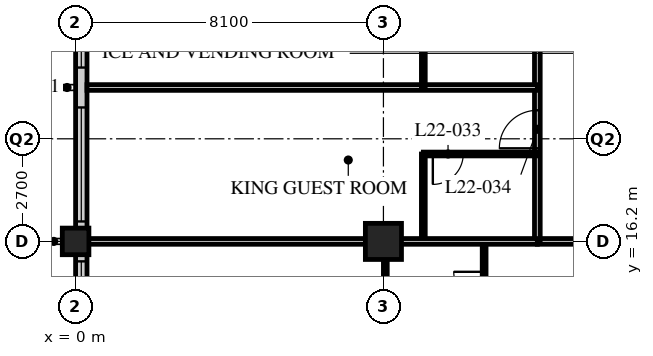
"""IFC4 building model, lengths in metres.
Left out: names, types, materials, properties, quantities, classifications, styles, units other than length and angle.
Written with IfcOpenShell. Run it as: python <this file> out.ifc"""

import sys

from ifc_helpers import new_model, si_unit, direction, frame, frame_2d, origin, origin_2d, place, context, subcontext, project, spatial, rectangle, hollow_rectangle, extrude, element, fill, save


model = new_model("IFC4")
c1 = context("Model", 3, precision=1e-05, world=origin(), true_north=direction((0.0, 1.0)))
c2 = subcontext(c1, "Body", "Model", "MODEL_VIEW")
j1 = project(units=[si_unit("LENGTHUNIT", "METRE"), si_unit("PLANEANGLEUNIT", "RADIAN")], contexts=[c1])
p1 = place(None, origin())
s1 = spatial("IfcSite", under=j1, at=p1, CompositionType="ELEMENT")
p2 = place(p1, origin())
s2 = spatial("IfcBuilding", under=s1, at=p2, CompositionType="ELEMENT")
p3 = place(p2, frame((0.0, 0.0, 87.4)))
s3 = spatial("IfcBuildingStorey", under=s2, at=p3, CompositionType="ELEMENT", Elevation=87.4)
p4 = place(p3, frame((0.0, 16.2, 0.0), z_axis=(0.0, 0.0, 1.0), x_axis=(1.0, 0.0, 0.0)))
e1 = element("IfcColumn", 1, at=p4, inside=s3, PredefinedType="COLUMN", context=c2, shape_type="SweptSolid", body=[
    extrude(hollow_rectangle(XDim=0.7, YDim=0.7, WallThickness=0.06, at=origin_2d()), origin(), (0.0, 0.0, 1.0), 3.4),
])
p5 = place(p3, frame((8.1, 16.2, 0.0), z_axis=(0.0, 0.0, 1.0), x_axis=(1.0, 0.0, 0.0)))
e2 = element("IfcColumn", 2, at=p5, inside=s3, PredefinedType="COLUMN", context=c2, shape_type="SweptSolid", body=[
    extrude(hollow_rectangle(XDim=0.95, YDim=0.95, WallThickness=0.095, at=origin_2d()), origin(), (0.0, 0.0, 1.0), 3.4),
])
p6 = place(p3, frame((0.15, 40.2, 0.0), z_axis=(0.0, 0.0, 1.0), x_axis=(0.0, -1.0, 0.0)))
e3 = element("IfcWall", 3, at=p6, inside=s3, PredefinedType="SOLIDWALL", context=c2, shape_type="SweptSolid", body=[
    extrude(rectangle(XDim=32.1, YDim=0.3, at=frame_2d((16.05, 0.0))), origin(), (0.0, 0.0, 1.0), 2.05),
])
p7 = place(p6, frame((0.225, 0.0, 0.9)))
e4 = element("IfcOpeningElement", 4, at=p7, cuts=e3, PredefinedType="OPENING", context=c2, shape_type="SweptSolid", body=[
    extrude(rectangle(XDim=3.0, YDim=1.1, at=frame_2d((1.5, 0.55))), frame((0.0, 0.16, 0.0), z_axis=(0.0, -1.0, 0.0), x_axis=(1.0, 0.0, 0.0)), (0.0, 0.0, 1.0), 0.32),
])
p8 = place(p6, frame((4.275, 0.0, 0.9)))
e5 = element("IfcOpeningElement", 5, at=p8, cuts=e3, PredefinedType="OPENING", context=c2, shape_type="SweptSolid", body=[
    extrude(rectangle(XDim=3.0, YDim=1.1, at=frame_2d((1.5, 0.55))), frame((0.0, 0.16, 0.0), z_axis=(0.0, -1.0, 0.0), x_axis=(1.0, 0.0, 0.0)), (0.0, 0.0, 1.0), 0.32),
])
p9 = place(p6, frame((8.325, 0.0, 0.9)))
e6 = element("IfcOpeningElement", 6, at=p9, cuts=e3, PredefinedType="OPENING", context=c2, shape_type="SweptSolid", body=[
    extrude(rectangle(XDim=3.0, YDim=1.1, at=frame_2d((1.5, 0.55))), frame((0.0, 0.16, 0.0), z_axis=(0.0, -1.0, 0.0), x_axis=(1.0, 0.0, 0.0)), (0.0, 0.0, 1.0), 0.32),
])
p10 = place(p6, frame((12.375, 0.0, 0.9)))
e7 = element("IfcOpeningElement", 7, at=p10, cuts=e3, PredefinedType="OPENING", context=c2, shape_type="SweptSolid", body=[
    extrude(rectangle(XDim=3.0, YDim=1.1, at=frame_2d((1.5, 0.55))), frame((0.0, 0.16, 0.0), z_axis=(0.0, -1.0, 0.0), x_axis=(1.0, 0.0, 0.0)), (0.0, 0.0, 1.0), 0.32),
])
p11 = place(p6, frame((16.425, 0.0, 0.9)))
e8 = element("IfcOpeningElement", 8, at=p11, cuts=e3, PredefinedType="OPENING", context=c2, shape_type="SweptSolid", body=[
    extrude(rectangle(XDim=3.0, YDim=1.1, at=frame_2d((1.5, 0.55))), frame((0.0, 0.16, 0.0), z_axis=(0.0, -1.0, 0.0), x_axis=(1.0, 0.0, 0.0)), (0.0, 0.0, 1.0), 0.32),
])
p12 = place(p6, frame((20.475, 0.0, 0.9)))
e9 = element("IfcOpeningElement", 9, at=p12, cuts=e3, PredefinedType="OPENING", context=c2, shape_type="SweptSolid", body=[
    extrude(rectangle(XDim=3.0, YDim=1.1, at=frame_2d((1.5, 0.55))), frame((0.0, 0.16, 0.0), z_axis=(0.0, -1.0, 0.0), x_axis=(1.0, 0.0, 0.0)), (0.0, 0.0, 1.0), 0.32),
])
p13 = place(p6, frame((24.525, 0.0, 0.9)))
e10 = element("IfcOpeningElement", 10, at=p13, cuts=e3, PredefinedType="OPENING", context=c2, shape_type="SweptSolid", body=[
    extrude(rectangle(XDim=3.0, YDim=1.1, at=frame_2d((1.5, 0.55))), frame((0.0, 0.16, 0.0), z_axis=(0.0, -1.0, 0.0), x_axis=(1.0, 0.0, 0.0)), (0.0, 0.0, 1.0), 0.32),
])
p14 = place(p6, frame((28.575, 0.0, 0.9)))
e11 = element("IfcOpeningElement", 11, at=p14, cuts=e3, PredefinedType="OPENING", context=c2, shape_type="SweptSolid", body=[
    extrude(rectangle(XDim=3.0, YDim=1.1, at=frame_2d((1.5, 0.55))), frame((0.0, 0.16, 0.0), z_axis=(0.0, -1.0, 0.0), x_axis=(1.0, 0.0, 0.0)), (0.0, 0.0, 1.0), 0.32),
])
p15 = place(p3, frame((12.15, 16.2, 0.0), z_axis=(0.0, 0.0, 1.0), x_axis=(1.0, 0.0, 0.0)))
e12 = element("IfcWall", 12, at=p15, inside=s3, PredefinedType="PARTITIONING", context=c2, shape_type="SweptSolid", body=[
    extrude(rectangle(XDim=32.4, YDim=0.15, at=frame_2d((16.2, 0.0))), origin(), (0.0, 0.0, 1.0), 2.388),
])
p16 = place(p15, frame((6.5, 0.0, 0.0)))
e13 = element("IfcOpeningElement", 13, at=p16, cuts=e12, PredefinedType="OPENING", context=c2, shape_type="SweptSolid", body=[
    extrude(rectangle(XDim=1.0, YDim=2.1, at=frame_2d((0.5, 1.05))), frame((0.0, 0.085, 0.0), z_axis=(0.0, -1.0, 0.0), x_axis=(1.0, 0.0, 0.0)), (0.0, 0.0, 1.0), 0.17),
])
p17 = place(p15, frame((8.4, 0.0, 0.0)))
e14 = element("IfcOpeningElement", 14, at=p17, cuts=e12, PredefinedType="OPENING", context=c2, shape_type="SweptSolid", body=[
    extrude(rectangle(XDim=1.0, YDim=2.1, at=frame_2d((0.5, 1.05))), frame((0.0, 0.085, 0.0), z_axis=(0.0, -1.0, 0.0), x_axis=(1.0, 0.0, 0.0)), (0.0, 0.0, 1.0), 0.17),
])
p18 = place(p15, frame((14.9, 0.0, 0.0)))
e15 = element("IfcOpeningElement", 15, at=p18, cuts=e12, PredefinedType="OPENING", context=c2, shape_type="SweptSolid", body=[
    extrude(rectangle(XDim=1.0, YDim=2.1, at=frame_2d((0.5, 1.05))), frame((0.0, 0.085, 0.0), z_axis=(0.0, -1.0, 0.0), x_axis=(1.0, 0.0, 0.0)), (0.0, 0.0, 1.0), 0.17),
])
p19 = place(p15, frame((16.5, 0.0, 0.0)))
e16 = element("IfcOpeningElement", 16, at=p19, cuts=e12, PredefinedType="OPENING", context=c2, shape_type="SweptSolid", body=[
    extrude(rectangle(XDim=1.0, YDim=2.1, at=frame_2d((0.5, 1.05))), frame((0.0, 0.085, 0.0), z_axis=(0.0, -1.0, 0.0), x_axis=(1.0, 0.0, 0.0)), (0.0, 0.0, 1.0), 0.17),
])
p20 = place(p15, frame((23.0, 0.0, 0.0)))
e17 = element("IfcOpeningElement", 17, at=p20, cuts=e12, PredefinedType="OPENING", context=c2, shape_type="SweptSolid", body=[
    extrude(rectangle(XDim=1.0, YDim=2.1, at=frame_2d((0.5, 1.05))), frame((0.0, 0.085, 0.0), z_axis=(0.0, -1.0, 0.0), x_axis=(1.0, 0.0, 0.0)), (0.0, 0.0, 1.0), 0.17),
])
p21 = place(p15, frame((24.9, 0.0, 0.0)))
e18 = element("IfcOpeningElement", 18, at=p21, cuts=e12, PredefinedType="OPENING", context=c2, shape_type="SweptSolid", body=[
    extrude(rectangle(XDim=1.0, YDim=2.1, at=frame_2d((0.5, 1.05))), frame((0.0, 0.085, 0.0), z_axis=(0.0, -1.0, 0.0), x_axis=(1.0, 0.0, 0.0)), (0.0, 0.0, 1.0), 0.17),
])
p22 = place(p15, frame((1.525, 0.0, 0.0)))
e19 = element("IfcOpeningElement", 19, at=p22, cuts=e12, PredefinedType="OPENING", context=c2, shape_type="SweptSolid", body=[
    extrude(rectangle(XDim=1.0, YDim=2.1, at=frame_2d((0.5, 1.05))), frame((0.0, 0.085, 0.0), z_axis=(0.0, -1.0, 0.0), x_axis=(1.0, 0.0, 0.0)), (0.0, 0.0, 1.0), 0.17),
])
p23 = place(p15, frame((29.875, 0.0, 0.0)))
e20 = element("IfcOpeningElement", 20, at=p23, cuts=e12, PredefinedType="OPENING", context=c2, shape_type="SweptSolid", body=[
    extrude(rectangle(XDim=1.0, YDim=2.1, at=frame_2d((0.5, 1.05))), frame((0.0, 0.085, 0.0), z_axis=(0.0, -1.0, 0.0), x_axis=(1.0, 0.0, 0.0)), (0.0, 0.0, 1.0), 0.17),
])
p24 = place(p3, frame((12.15, 16.2, 0.0), z_axis=(0.0, 0.0, 1.0), x_axis=(0.0, 1.0, 0.0)))
e21 = element("IfcWall", 21, at=p24, inside=s3, PredefinedType="PARTITIONING", context=c2, shape_type="SweptSolid", body=[
    extrude(rectangle(XDim=26.1, YDim=0.15, at=frame_2d((13.05, 0.0))), origin(), (0.0, 0.0, 1.0), 3.15),
])
p25 = place(p24, frame((2.45, 0.0, 0.0)))
e22 = element("IfcOpeningElement", 22, at=p25, cuts=e21, PredefinedType="OPENING", context=c2, shape_type="SweptSolid", body=[
    extrude(rectangle(XDim=1.0, YDim=2.1, at=frame_2d((0.5, 1.05))), frame((0.0, 0.085, 0.0), z_axis=(0.0, -1.0, 0.0), x_axis=(1.0, 0.0, 0.0)), (0.0, 0.0, 1.0), 0.17),
])
p26 = place(p24, frame((6.5, 0.0, 0.0)))
e23 = element("IfcOpeningElement", 23, at=p26, cuts=e21, PredefinedType="OPENING", context=c2, shape_type="SweptSolid", body=[
    extrude(rectangle(XDim=1.0, YDim=2.1, at=frame_2d((0.5, 1.05))), frame((0.0, 0.085, 0.0), z_axis=(0.0, -1.0, 0.0), x_axis=(1.0, 0.0, 0.0)), (0.0, 0.0, 1.0), 0.17),
])
p27 = place(p24, frame((10.0, 0.0, 0.0)))
e24 = element("IfcOpeningElement", 24, at=p27, cuts=e21, PredefinedType="OPENING", context=c2, shape_type="SweptSolid", body=[
    extrude(rectangle(XDim=1.0, YDim=2.1, at=frame_2d((0.5, 1.05))), frame((0.0, 0.085, 0.0), z_axis=(0.0, -1.0, 0.0), x_axis=(1.0, 0.0, 0.0)), (0.0, 0.0, 1.0), 0.17),
])
p28 = place(p24, frame((18.1, 0.0, 0.0)))
e25 = element("IfcOpeningElement", 25, at=p28, cuts=e21, PredefinedType="OPENING", context=c2, shape_type="SweptSolid", body=[
    extrude(rectangle(XDim=1.0, YDim=2.1, at=frame_2d((0.5, 1.05))), frame((0.0, 0.085, 0.0), z_axis=(0.0, -1.0, 0.0), x_axis=(1.0, 0.0, 0.0)), (0.0, 0.0, 1.0), 0.17),
])
p29 = place(p3, frame((9.15, 16.2, 0.0), z_axis=(0.0, 0.0, 1.0), x_axis=(0.0, 1.0, 0.0)))
e26 = element("IfcWall", 26, at=p29, inside=s3, PredefinedType="PARTITIONING", context=c2, shape_type="SweptSolid", body=[
    extrude(rectangle(XDim=2.3, YDim=0.1, at=frame_2d((1.15, 0.0))), origin(), (0.0, 0.0, 1.0), 3.15),
])
p30 = place(p3, frame((12.15, 18.5, 0.0), z_axis=(0.0, 0.0, 1.0), x_axis=(-1.0, 0.0, 0.0)))
e27 = element("IfcWall", 27, at=p30, inside=s3, PredefinedType="PARTITIONING", context=c2, shape_type="SweptSolid", body=[
    extrude(rectangle(XDim=3.0, YDim=0.1, at=frame_2d((1.5, 0.0))), origin(), (0.0, 0.0, 1.0), 3.15),
])
p31 = place(p30, frame((1.95, 0.0, 0.0)))
e28 = element("IfcOpeningElement", 28, at=p31, cuts=e27, PredefinedType="OPENING", context=c2, shape_type="SweptSolid", body=[
    extrude(rectangle(XDim=0.8, YDim=2.1, at=frame_2d((0.4, 1.05))), frame((0.0, 0.06, 0.0), z_axis=(0.0, -1.0, 0.0), x_axis=(1.0, 0.0, 0.0)), (0.0, 0.0, 1.0), 0.12),
])
p32 = place(p3, frame((12.15, 20.25, 0.0), z_axis=(0.0, 0.0, 1.0), x_axis=(-1.0, 0.0, 0.0)))
e29 = element("IfcWall", 29, at=p32, inside=s3, PredefinedType="PARTITIONING", context=c2, shape_type="SweptSolid", body=[
    extrude(rectangle(XDim=11.85, YDim=0.15, at=frame_2d((5.925, 0.0))), origin(), (0.0, 0.0, 1.0), 3.15),
])
p33 = place(p3, frame((9.15, 20.25, 0.0), z_axis=(0.0, 0.0, 1.0), x_axis=(0.0, 1.0, 0.0)))
e30 = element("IfcWall", 30, at=p33, inside=s3, PredefinedType="PARTITIONING", context=c2, shape_type="SweptSolid", body=[
    extrude(rectangle(XDim=2.3, YDim=0.1, at=frame_2d((1.15, 0.0))), origin(), (0.0, 0.0, 1.0), 3.15),
])
p34 = place(p3, frame((10.75, 16.2, 0.0), z_axis=(0.0, 0.0, 1.0), x_axis=(0.0, -1.0, 0.0)))
e31 = element("IfcWall", 31, at=p34, inside=s3, PredefinedType="PARTITIONING", context=c2, shape_type="SweptSolid", body=[
    extrude(rectangle(XDim=2.4, YDim=0.1, at=frame_2d((1.2, 0.0))), origin(), (0.0, 0.0, 1.0), 3.15),
])
p35 = place(p34, frame((0.8, 0.0, 0.0)))
e32 = element("IfcOpeningElement", 32, at=p35, cuts=e31, PredefinedType="OPENING", context=c2, shape_type="SweptSolid", body=[
    extrude(rectangle(XDim=0.8, YDim=2.1, at=frame_2d((0.4, 1.05))), frame((0.0, 0.06, 0.0), z_axis=(0.0, -1.0, 0.0), x_axis=(1.0, 0.0, 0.0)), (0.0, 0.0, 1.0), 0.12),
])
p36 = place(p3, frame((8.15, 16.2, 0.0), z_axis=(0.0, 0.0, 1.0), x_axis=(0.0, -1.0, 0.0)))
e33 = element("IfcWall", 33, at=p36, inside=s3, PredefinedType="PARTITIONING", context=c2, shape_type="SweptSolid", body=[
    extrude(rectangle(XDim=2.4, YDim=0.1, at=frame_2d((1.2, 0.0))), origin(), (0.0, 0.0, 1.0), 2.05),
])
p37 = place(p3, frame((0.3, 16.2, 0.0), z_axis=(0.0, 0.0, 1.0), x_axis=(1.0, 0.0, 0.0)))
e34 = element("IfcWall", 34, at=p37, inside=s3, PredefinedType="PARTITIONING", context=c2, shape_type="SweptSolid", body=[
    extrude(rectangle(XDim=11.85, YDim=0.15, at=frame_2d((5.925, 0.0))), origin(), (0.0, 0.0, 1.0), 2.388),
])
p38 = place(p11, origin())
e35 = element("IfcWindow", 35, at=p38, inside=s3, PartitioningType="SINGLE_PANEL", PredefinedType="WINDOW", context=c2, shape_type="SweptSolid", body=[
    extrude(rectangle(XDim=3.0, YDim=1.1, at=frame_2d((1.5, 0.55))), frame((0.0, 0.03, 0.0), z_axis=(0.0, -1.0, 0.0), x_axis=(1.0, 0.0, 0.0)), (0.0, 0.0, 1.0), 0.06),
])
fill(e8, e35)
p39 = place(p12, origin())
e36 = element("IfcWindow", 36, at=p39, inside=s3, PartitioningType="SINGLE_PANEL", PredefinedType="WINDOW", context=c2, shape_type="SweptSolid", body=[
    extrude(rectangle(XDim=3.0, YDim=1.1, at=frame_2d((1.5, 0.55))), frame((0.0, 0.03, 0.0), z_axis=(0.0, -1.0, 0.0), x_axis=(1.0, 0.0, 0.0)), (0.0, 0.0, 1.0), 0.06),
])
fill(e9, e36)
p40 = place(p13, origin())
e37 = element("IfcWindow", 37, at=p40, inside=s3, PartitioningType="SINGLE_PANEL", PredefinedType="WINDOW", context=c2, shape_type="SweptSolid", body=[
    extrude(rectangle(XDim=3.0, YDim=1.1, at=frame_2d((1.5, 0.55))), frame((0.0, 0.03, 0.0), z_axis=(0.0, -1.0, 0.0), x_axis=(1.0, 0.0, 0.0)), (0.0, 0.0, 1.0), 0.06),
])
fill(e10, e37)
p41 = place(p31, origin())
e38 = element("IfcDoor", 38, at=p41, inside=s3, OperationType="SINGLE_SWING_RIGHT", PredefinedType="DOOR", context=c2, shape_type="SweptSolid", body=[
    extrude(rectangle(XDim=0.8, YDim=2.1, at=frame_2d((0.4, 1.05))), frame((0.0, 0.025, 0.0), z_axis=(0.0, -1.0, 0.0), x_axis=(1.0, 0.0, 0.0)), (0.0, 0.0, 1.0), 0.05),
])
fill(e28, e38)
p42 = place(p25, origin())
e39 = element("IfcDoor", 39, at=p42, inside=s3, OperationType="SINGLE_SWING_LEFT", PredefinedType="DOOR", context=c2, shape_type="SweptSolid", body=[
    extrude(rectangle(XDim=1.0, YDim=2.1, at=frame_2d((0.5, 1.05))), frame((0.0, 0.025, 0.0), z_axis=(0.0, -1.0, 0.0), x_axis=(1.0, 0.0, 0.0)), (0.0, 0.0, 1.0), 0.05),
])
fill(e22, e39)
p43 = place(p35, origin())
e40 = element("IfcDoor", 40, at=p43, inside=s3, OperationType="SINGLE_SWING_RIGHT", PredefinedType="DOOR", context=c2, shape_type="SweptSolid", body=[
    extrude(rectangle(XDim=0.8, YDim=2.1, at=frame_2d((0.4, 1.05))), frame((0.0, 0.025, 0.0), z_axis=(0.0, -1.0, 0.0), x_axis=(1.0, 0.0, 0.0)), (0.0, 0.0, 1.0), 0.05),
])
fill(e32, e40)
save(model, sys.argv[1])
